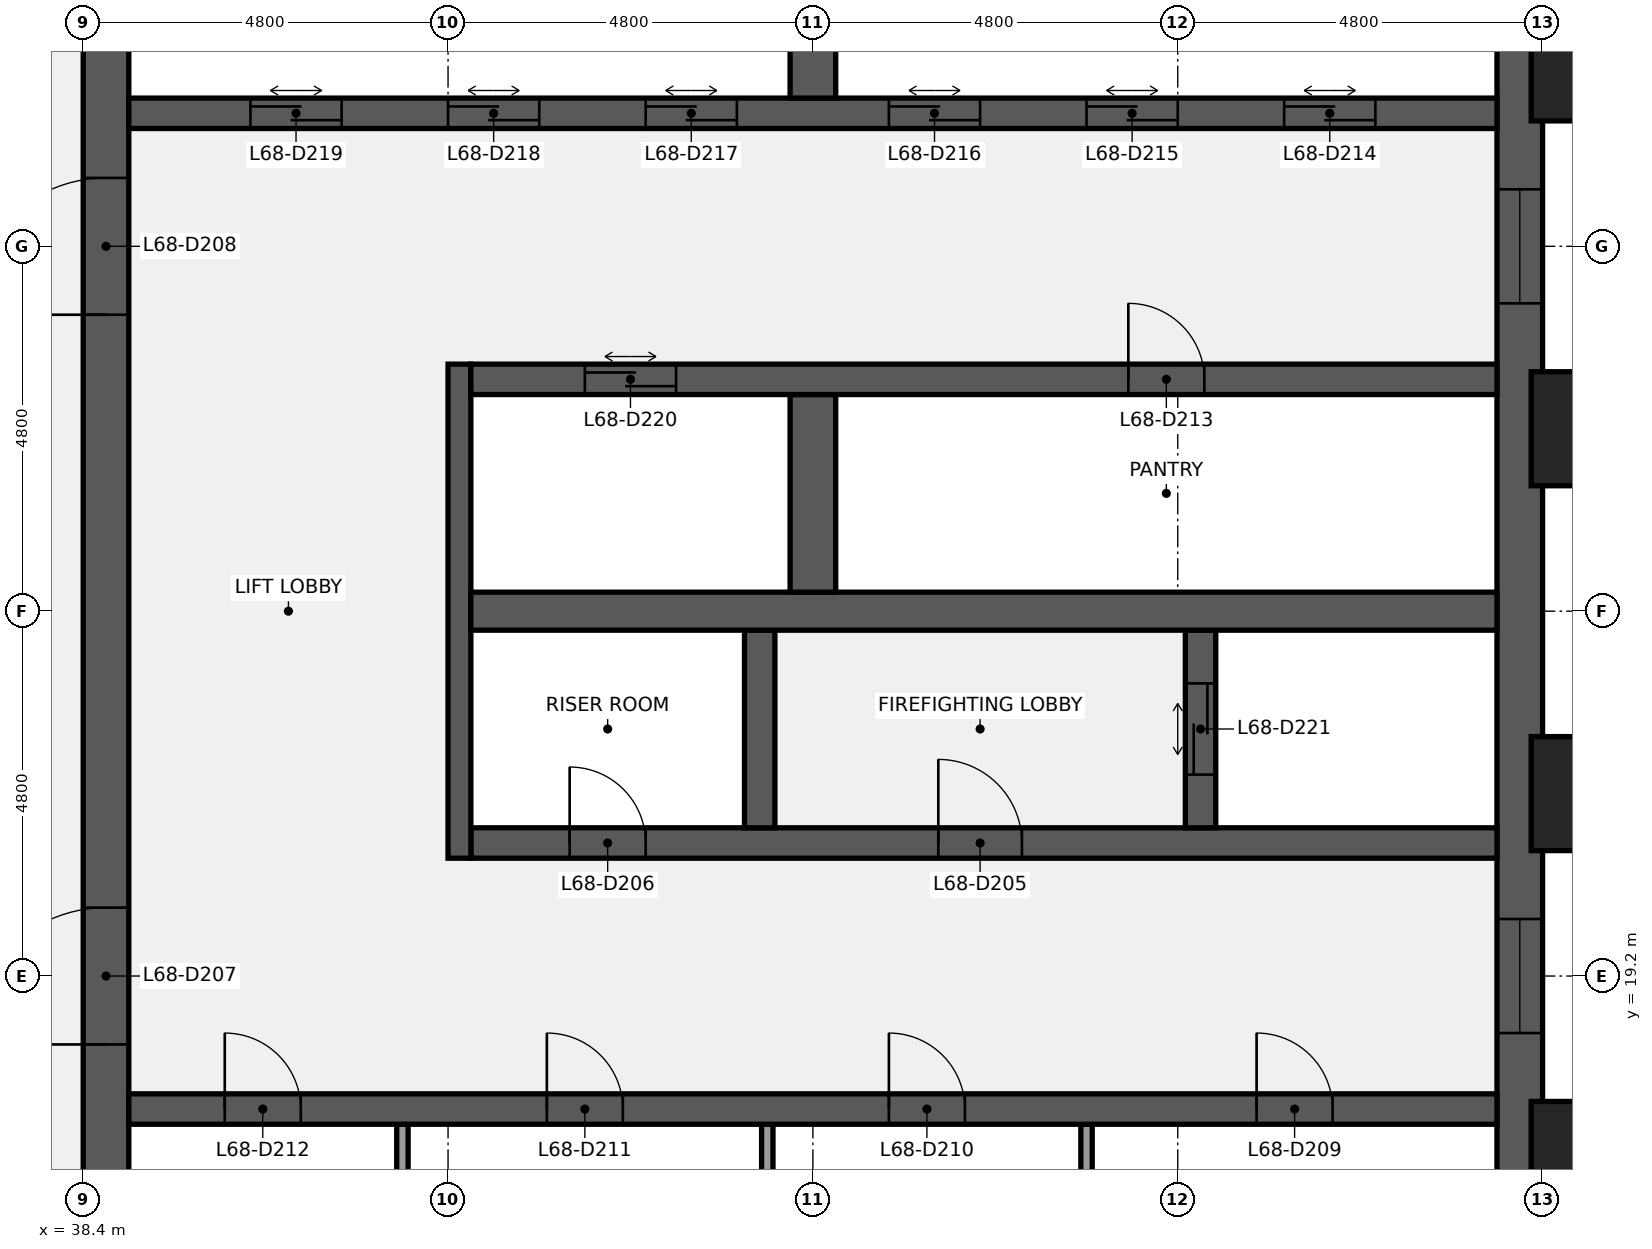
"""IFC4 building model, lengths in metres.
Left out: names, types, materials, properties, quantities, classifications, styles, units other than length and angle.
Written with IfcOpenShell. Run it as: python <this file> out.ifc"""

import sys

from ifc_helpers import new_model, si_unit, direction, frame, frame_2d, origin, origin_2d, place, context, subcontext, project, spatial, rectangle, extrude, element, fill, save


model = new_model("IFC4")
c1 = context("Model", 3, precision=1e-05, world=origin(), true_north=direction((0.0, 1.0)))
c2 = subcontext(c1, "Body", "Model", "MODEL_VIEW")
j1 = project(units=[si_unit("LENGTHUNIT", "METRE"), si_unit("PLANEANGLEUNIT", "RADIAN")], contexts=[c1])
p1 = place(None, origin())
s1 = spatial("IfcSite", under=j1, at=p1, CompositionType="ELEMENT")
p2 = place(p1, origin())
s2 = spatial("IfcBuilding", under=s1, at=p2, CompositionType="ELEMENT")
p3 = place(p2, frame((0.0, 0.0, 310.3)))
s3 = spatial("IfcBuildingStorey", under=s2, at=p3, CompositionType="ELEMENT", Elevation=310.3)
p4 = place(p3, frame((57.3, 38.4, 0.0), z_axis=(0.0, 0.0, 1.0), x_axis=(0.0, -1.0, 0.0)))
e1 = element("IfcWall", 1, at=p4, inside=s3, PredefinedType="SHEAR", context=c2, shape_type="SweptSolid", body=[
    extrude(rectangle(XDim=28.8, YDim=0.6, at=frame_2d((14.4, 0.0))), origin(), (0.0, 0.0, 1.0), 3.84),
])
p5 = place(p4, frame((18.45, 0.0, 0.9)))
e2 = element("IfcOpeningElement", 2, at=p5, cuts=e1, PredefinedType="OPENING", context=c2, shape_type="SweptSolid", body=[
    extrude(rectangle(XDim=1.5, YDim=1.5, at=frame_2d((0.75, 0.75))), frame((0.0, 0.31, 0.0), z_axis=(0.0, -1.0, 0.0), x_axis=(1.0, 0.0, 0.0)), (0.0, 0.0, 1.0), 0.62),
])
p6 = place(p4, frame((8.85, 0.0, 0.9)))
e3 = element("IfcOpeningElement", 3, at=p6, cuts=e1, PredefinedType="OPENING", context=c2, shape_type="SweptSolid", body=[
    extrude(rectangle(XDim=1.5, YDim=1.5, at=frame_2d((0.75, 0.75))), frame((0.0, 0.31, 0.0), z_axis=(0.0, -1.0, 0.0), x_axis=(1.0, 0.0, 0.0)), (0.0, 0.0, 1.0), 0.62),
])
p7 = place(p3, frame((38.7, 9.6, 0.0), z_axis=(0.0, 0.0, 1.0), x_axis=(0.0, 1.0, 0.0)))
e4 = element("IfcWall", 4, at=p7, inside=s3, PredefinedType="SHEAR", context=c2, shape_type="SweptSolid", body=[
    extrude(rectangle(XDim=28.8, YDim=0.6, at=frame_2d((14.4, 0.0))), origin(), (0.0, 0.0, 1.0), 3.84),
])
p8 = place(p7, frame((8.7, 0.0, 0.0)))
e5 = element("IfcOpeningElement", 5, at=p8, cuts=e4, PredefinedType="OPENING", context=c2, shape_type="SweptSolid", body=[
    extrude(rectangle(XDim=1.8, YDim=2.1, at=frame_2d((0.9, 1.05))), frame((0.0, 0.31, 0.0), z_axis=(0.0, -1.0, 0.0), x_axis=(1.0, 0.0, 0.0)), (0.0, 0.0, 1.0), 0.62),
])
p9 = place(p7, frame((18.3, 0.0, 0.0)))
e6 = element("IfcOpeningElement", 6, at=p9, cuts=e4, PredefinedType="OPENING", context=c2, shape_type="SweptSolid", body=[
    extrude(rectangle(XDim=1.8, YDim=2.1, at=frame_2d((0.9, 1.05))), frame((0.0, 0.31, 0.0), z_axis=(0.0, -1.0, 0.0), x_axis=(1.0, 0.0, 0.0)), (0.0, 0.0, 1.0), 0.62),
])
for number, where, z_axis, x_axis in (
    (7, (51.6, 14.65, 0.0), (0.0, 0.0, 1.0), (0.0, 1.0, 0.0)),
    (8, (47.4, 14.65, 0.0), (0.0, 0.0, 1.0), (0.0, 1.0, 0.0)),
    (9, (42.6, 14.65, 0.0), (0.0, 0.0, 1.0), (0.0, 1.0, 0.0)),
):
    element("IfcWall", number, at=place(p3, frame(where, z_axis=z_axis, x_axis=x_axis)), inside=s3, PredefinedType="PARTITIONING", context=c2, shape_type="SweptSolid", body=[
        extrude(rectangle(XDim=2.6, YDim=0.15, at=frame_2d((1.3, 0.0))), origin(), (0.0, 0.0, 1.0), 3.84),
    ])
p10 = place(p3, frame((39.0, 17.45, 0.0), z_axis=(0.0, 0.0, 1.0), x_axis=(1.0, 0.0, 0.0)))
e10 = element("IfcWall", 10, at=p10, inside=s3, PredefinedType="SHEAR", context=c2, shape_type="SweptSolid", body=[
    extrude(rectangle(XDim=18.0, YDim=0.4, at=frame_2d((9.0, 0.0))), origin(), (0.0, 0.0, 1.0), 3.84),
])
p11 = place(p10, frame((14.837, 0.0, 0.0)))
e11 = element("IfcOpeningElement", 11, at=p11, cuts=e10, PredefinedType="OPENING", context=c2, shape_type="SweptSolid", body=[
    extrude(rectangle(XDim=1.0, YDim=2.1, at=frame_2d((0.5, 1.05))), frame((0.0, 0.21, 0.0), z_axis=(0.0, -1.0, 0.0), x_axis=(1.0, 0.0, 0.0)), (0.0, 0.0, 1.0), 0.42),
])
p12 = place(p10, frame((10.0, 0.0, 0.0)))
e12 = element("IfcOpeningElement", 12, at=p12, cuts=e10, PredefinedType="OPENING", context=c2, shape_type="SweptSolid", body=[
    extrude(rectangle(XDim=1.0, YDim=2.1, at=frame_2d((0.5, 1.05))), frame((0.0, 0.21, 0.0), z_axis=(0.0, -1.0, 0.0), x_axis=(1.0, 0.0, 0.0)), (0.0, 0.0, 1.0), 0.42),
])
p13 = place(p10, frame((5.5, 0.0, 0.0)))
e13 = element("IfcOpeningElement", 13, at=p13, cuts=e10, PredefinedType="OPENING", context=c2, shape_type="SweptSolid", body=[
    extrude(rectangle(XDim=1.0, YDim=2.1, at=frame_2d((0.5, 1.05))), frame((0.0, 0.21, 0.0), z_axis=(0.0, -1.0, 0.0), x_axis=(1.0, 0.0, 0.0)), (0.0, 0.0, 1.0), 0.42),
])
p14 = place(p10, frame((1.262, 0.0, 0.0)))
e14 = element("IfcOpeningElement", 14, at=p14, cuts=e10, PredefinedType="OPENING", context=c2, shape_type="SweptSolid", body=[
    extrude(rectangle(XDim=1.0, YDim=2.1, at=frame_2d((0.5, 1.05))), frame((0.0, 0.21, 0.0), z_axis=(0.0, -1.0, 0.0), x_axis=(1.0, 0.0, 0.0)), (0.0, 0.0, 1.0), 0.42),
])
p15 = place(p3, frame((43.5, 20.95, 0.0), z_axis=(0.0, 0.0, 1.0), x_axis=(1.0, 0.0, 0.0)))
e15 = element("IfcWall", 15, at=p15, inside=s3, PredefinedType="SHEAR", context=c2, shape_type="SweptSolid", body=[
    extrude(rectangle(XDim=13.5, YDim=0.4, at=frame_2d((6.75, 0.0))), origin(), (0.0, 0.0, 1.0), 3.84),
])
p16 = place(p15, frame((6.15, 0.0, 0.0)))
e16 = element("IfcOpeningElement", 16, at=p16, cuts=e15, PredefinedType="OPENING", context=c2, shape_type="SweptSolid", body=[
    extrude(rectangle(XDim=1.1, YDim=2.1, at=frame_2d((0.55, 1.05))), frame((0.0, 0.21, 0.0), z_axis=(0.0, -1.0, 0.0), x_axis=(1.0, 0.0, 0.0)), (0.0, 0.0, 1.0), 0.42),
])
p17 = place(p15, frame((1.3, 0.0, 0.0)))
e17 = element("IfcOpeningElement", 17, at=p17, cuts=e15, PredefinedType="OPENING", context=c2, shape_type="SweptSolid", body=[
    extrude(rectangle(XDim=1.0, YDim=2.1, at=frame_2d((0.5, 1.05))), frame((0.0, 0.21, 0.0), z_axis=(0.0, -1.0, 0.0), x_axis=(1.0, 0.0, 0.0)), (0.0, 0.0, 1.0), 0.42),
])
p18 = place(p3, frame((43.35, 20.75, 0.0), z_axis=(0.0, 0.0, 1.0), x_axis=(0.0, 1.0, 0.0)))
e18 = element("IfcWall", 18, at=p18, inside=s3, PredefinedType="SHEAR", context=c2, shape_type="SweptSolid", body=[
    extrude(rectangle(XDim=6.5, YDim=0.3, at=frame_2d((3.25, 0.0))), origin(), (0.0, 0.0, 1.0), 3.84),
])
p19 = place(p3, frame((53.1, 21.15, 0.0), z_axis=(0.0, 0.0, 1.0), x_axis=(0.0, 1.0, 0.0)))
e19 = element("IfcWall", 19, at=p19, inside=s3, PredefinedType="SHEAR", context=c2, shape_type="SweptSolid", body=[
    extrude(rectangle(XDim=2.6, YDim=0.4, at=frame_2d((1.3, 0.0))), origin(), (0.0, 0.0, 1.0), 3.84),
])
p20 = place(p19, frame((0.7, 0.0, 0.0)))
e20 = element("IfcOpeningElement", 20, at=p20, cuts=e19, PredefinedType="OPENING", context=c2, shape_type="SweptSolid", body=[
    extrude(rectangle(XDim=1.2, YDim=2.1, at=frame_2d((0.6, 1.05))), frame((0.0, 0.21, 0.0), z_axis=(0.0, -1.0, 0.0), x_axis=(1.0, 0.0, 0.0)), (0.0, 0.0, 1.0), 0.42),
])
p21 = place(p3, frame((47.3, 21.15, 0.0), z_axis=(0.0, 0.0, 1.0), x_axis=(0.0, 1.0, 0.0)))
e21 = element("IfcWall", 21, at=p21, inside=s3, PredefinedType="SHEAR", context=c2, shape_type="SweptSolid", body=[
    extrude(rectangle(XDim=2.6, YDim=0.4, at=frame_2d((1.3, 0.0))), origin(), (0.0, 0.0, 1.0), 3.84),
])
p22 = place(p3, frame((43.5, 24.0, 0.0), z_axis=(0.0, 0.0, 1.0), x_axis=(1.0, 0.0, 0.0)))
e22 = element("IfcWall", 22, at=p22, inside=s3, PredefinedType="SHEAR", context=c2, shape_type="SweptSolid", body=[
    extrude(rectangle(XDim=13.5, YDim=0.5, at=frame_2d((6.75, 0.0))), origin(), (0.0, 0.0, 1.0), 3.84),
])
p23 = place(p3, frame((48.0, 24.25, 0.0), z_axis=(0.0, 0.0, 1.0), x_axis=(0.0, 1.0, 0.0)))
e23 = element("IfcWall", 23, at=p23, inside=s3, PredefinedType="SHEAR", context=c2, shape_type="SweptSolid", body=[
    extrude(rectangle(XDim=2.6, YDim=0.6, at=frame_2d((1.3, 0.0))), origin(), (0.0, 0.0, 1.0), 3.84),
])
p24 = place(p3, frame((43.5, 27.05, 0.0), z_axis=(0.0, 0.0, 1.0), x_axis=(1.0, 0.0, 0.0)))
e24 = element("IfcWall", 24, at=p24, inside=s3, PredefinedType="SHEAR", context=c2, shape_type="SweptSolid", body=[
    extrude(rectangle(XDim=13.5, YDim=0.4, at=frame_2d((6.75, 0.0))), origin(), (0.0, 0.0, 1.0), 3.84),
])
p25 = place(p24, frame((8.65, 0.0, 0.0)))
e25 = element("IfcOpeningElement", 25, at=p25, cuts=e24, PredefinedType="OPENING", context=c2, shape_type="SweptSolid", body=[
    extrude(rectangle(XDim=1.0, YDim=2.1, at=frame_2d((0.5, 1.05))), frame((0.0, 0.21, 0.0), z_axis=(0.0, -1.0, 0.0), x_axis=(1.0, 0.0, 0.0)), (0.0, 0.0, 1.0), 0.42),
])
p26 = place(p24, frame((1.5, 0.0, 0.0)))
e26 = element("IfcOpeningElement", 26, at=p26, cuts=e24, PredefinedType="OPENING", context=c2, shape_type="SweptSolid", body=[
    extrude(rectangle(XDim=1.2, YDim=2.1, at=frame_2d((0.6, 1.05))), frame((0.0, 0.21, 0.0), z_axis=(0.0, -1.0, 0.0), x_axis=(1.0, 0.0, 0.0)), (0.0, 0.0, 1.0), 0.42),
])
p27 = place(p3, frame((39.0, 30.55, 0.0), z_axis=(0.0, 0.0, 1.0), x_axis=(1.0, 0.0, 0.0)))
e27 = element("IfcWall", 27, at=p27, inside=s3, PredefinedType="SHEAR", context=c2, shape_type="SweptSolid", body=[
    extrude(rectangle(XDim=18.0, YDim=0.4, at=frame_2d((9.0, 0.0))), origin(), (0.0, 0.0, 1.0), 3.84),
])
p28 = place(p27, frame((15.2, 0.0, 0.0)))
e28 = element("IfcOpeningElement", 28, at=p28, cuts=e27, PredefinedType="OPENING", context=c2, shape_type="SweptSolid", body=[
    extrude(rectangle(XDim=1.2, YDim=2.1, at=frame_2d((0.6, 1.05))), frame((0.0, 0.21, 0.0), z_axis=(0.0, -1.0, 0.0), x_axis=(1.0, 0.0, 0.0)), (0.0, 0.0, 1.0), 0.42),
])
p29 = place(p27, frame((12.6, 0.0, 0.0)))
e29 = element("IfcOpeningElement", 29, at=p29, cuts=e27, PredefinedType="OPENING", context=c2, shape_type="SweptSolid", body=[
    extrude(rectangle(XDim=1.2, YDim=2.1, at=frame_2d((0.6, 1.05))), frame((0.0, 0.21, 0.0), z_axis=(0.0, -1.0, 0.0), x_axis=(1.0, 0.0, 0.0)), (0.0, 0.0, 1.0), 0.42),
])
p30 = place(p27, frame((10.0, 0.0, 0.0)))
e30 = element("IfcOpeningElement", 30, at=p30, cuts=e27, PredefinedType="OPENING", context=c2, shape_type="SweptSolid", body=[
    extrude(rectangle(XDim=1.2, YDim=2.1, at=frame_2d((0.6, 1.05))), frame((0.0, 0.21, 0.0), z_axis=(0.0, -1.0, 0.0), x_axis=(1.0, 0.0, 0.0)), (0.0, 0.0, 1.0), 0.42),
])
p31 = place(p27, frame((6.8, 0.0, 0.0)))
e31 = element("IfcOpeningElement", 31, at=p31, cuts=e27, PredefinedType="OPENING", context=c2, shape_type="SweptSolid", body=[
    extrude(rectangle(XDim=1.2, YDim=2.1, at=frame_2d((0.6, 1.05))), frame((0.0, 0.21, 0.0), z_axis=(0.0, -1.0, 0.0), x_axis=(1.0, 0.0, 0.0)), (0.0, 0.0, 1.0), 0.42),
])
p32 = place(p27, frame((4.2, 0.0, 0.0)))
e32 = element("IfcOpeningElement", 32, at=p32, cuts=e27, PredefinedType="OPENING", context=c2, shape_type="SweptSolid", body=[
    extrude(rectangle(XDim=1.2, YDim=2.1, at=frame_2d((0.6, 1.05))), frame((0.0, 0.21, 0.0), z_axis=(0.0, -1.0, 0.0), x_axis=(1.0, 0.0, 0.0)), (0.0, 0.0, 1.0), 0.42),
])
p33 = place(p27, frame((1.6, 0.0, 0.0)))
e33 = element("IfcOpeningElement", 33, at=p33, cuts=e27, PredefinedType="OPENING", context=c2, shape_type="SweptSolid", body=[
    extrude(rectangle(XDim=1.2, YDim=2.1, at=frame_2d((0.6, 1.05))), frame((0.0, 0.21, 0.0), z_axis=(0.0, -1.0, 0.0), x_axis=(1.0, 0.0, 0.0)), (0.0, 0.0, 1.0), 0.42),
])
p34 = place(p3, frame((48.0, 30.75, 0.0), z_axis=(0.0, 0.0, 1.0), x_axis=(0.0, 1.0, 0.0)))
e34 = element("IfcWall", 34, at=p34, inside=s3, PredefinedType="SHEAR", context=c2, shape_type="SweptSolid", body=[
    extrude(rectangle(XDim=2.6, YDim=0.6, at=frame_2d((1.3, 0.0))), origin(), (0.0, 0.0, 1.0), 3.84),
])
for number, where, z_axis, x_axis in (
    (35, (58.35, 16.8, 0.0), (0.0, 0.0, 1.0), (0.0, 1.0, 0.0)),
    (36, (58.35, 21.6, 0.0), (0.0, 0.0, 1.0), (0.0, 1.0, 0.0)),
    (37, (58.35, 26.4, 0.0), (0.0, 0.0, 1.0), (0.0, 1.0, 0.0)),
    (38, (58.35, 31.2, 0.0), (0.0, 0.0, 1.0), (0.0, 1.0, 0.0)),
):
    element("IfcColumn", number, at=place(p3, frame(where, z_axis=z_axis, x_axis=x_axis)), inside=s3, PredefinedType="PILASTER", context=c2, shape_type="SweptSolid", body=[
        extrude(rectangle(XDim=1.8, YDim=1.5, at=origin_2d()), origin(), (0.0, 0.0, 1.0), 4.0),
    ])
p35 = place(p16, origin())
e39 = element("IfcDoor", 39, at=p35, inside=s3, OperationType="SINGLE_SWING_LEFT", PredefinedType="DOOR", context=c2, shape_type="SweptSolid", body=[
    extrude(rectangle(XDim=1.1, YDim=2.1, at=frame_2d((0.55, 1.05))), frame((0.0, 0.025, 0.0), z_axis=(0.0, -1.0, 0.0), x_axis=(1.0, 0.0, 0.0)), (0.0, 0.0, 1.0), 0.05),
])
fill(e16, e39)
p36 = place(p17, origin())
e40 = element("IfcDoor", 40, at=p36, inside=s3, OperationType="SINGLE_SWING_LEFT", PredefinedType="DOOR", context=c2, shape_type="SweptSolid", body=[
    extrude(rectangle(XDim=1.0, YDim=2.1, at=frame_2d((0.5, 1.05))), frame((0.0, 0.025, 0.0), z_axis=(0.0, -1.0, 0.0), x_axis=(1.0, 0.0, 0.0)), (0.0, 0.0, 1.0), 0.05),
])
fill(e17, e40)
p37 = place(p8, origin())
e41 = element("IfcDoor", 41, at=p37, inside=s3, OperationType="DOUBLE_DOOR_SINGLE_SWING", PredefinedType="DOOR", context=c2, shape_type="SweptSolid", body=[
    extrude(rectangle(XDim=1.8, YDim=2.1, at=frame_2d((0.9, 1.05))), frame((0.0, 0.025, 0.0), z_axis=(0.0, -1.0, 0.0), x_axis=(1.0, 0.0, 0.0)), (0.0, 0.0, 1.0), 0.05),
])
fill(e5, e41)
p38 = place(p9, origin())
e42 = element("IfcDoor", 42, at=p38, inside=s3, OperationType="DOUBLE_DOOR_SINGLE_SWING", PredefinedType="DOOR", context=c2, shape_type="SweptSolid", body=[
    extrude(rectangle(XDim=1.8, YDim=2.1, at=frame_2d((0.9, 1.05))), frame((0.0, 0.025, 0.0), z_axis=(0.0, -1.0, 0.0), x_axis=(1.0, 0.0, 0.0)), (0.0, 0.0, 1.0), 0.05),
])
fill(e6, e42)
p39 = place(p11, origin())
e43 = element("IfcDoor", 43, at=p39, inside=s3, OperationType="SINGLE_SWING_LEFT", PredefinedType="DOOR", context=c2, shape_type="SweptSolid", body=[
    extrude(rectangle(XDim=1.0, YDim=2.1, at=frame_2d((0.5, 1.05))), frame((0.0, 0.025, 0.0), z_axis=(0.0, -1.0, 0.0), x_axis=(1.0, 0.0, 0.0)), (0.0, 0.0, 1.0), 0.05),
])
fill(e11, e43)
p40 = place(p12, origin())
e44 = element("IfcDoor", 44, at=p40, inside=s3, OperationType="SINGLE_SWING_LEFT", PredefinedType="DOOR", context=c2, shape_type="SweptSolid", body=[
    extrude(rectangle(XDim=1.0, YDim=2.1, at=frame_2d((0.5, 1.05))), frame((0.0, 0.025, 0.0), z_axis=(0.0, -1.0, 0.0), x_axis=(1.0, 0.0, 0.0)), (0.0, 0.0, 1.0), 0.05),
])
fill(e12, e44)
p41 = place(p13, origin())
e45 = element("IfcDoor", 45, at=p41, inside=s3, OperationType="SINGLE_SWING_LEFT", PredefinedType="DOOR", context=c2, shape_type="SweptSolid", body=[
    extrude(rectangle(XDim=1.0, YDim=2.1, at=frame_2d((0.5, 1.05))), frame((0.0, 0.025, 0.0), z_axis=(0.0, -1.0, 0.0), x_axis=(1.0, 0.0, 0.0)), (0.0, 0.0, 1.0), 0.05),
])
fill(e13, e45)
p42 = place(p14, origin())
e46 = element("IfcDoor", 46, at=p42, inside=s3, OperationType="SINGLE_SWING_LEFT", PredefinedType="DOOR", context=c2, shape_type="SweptSolid", body=[
    extrude(rectangle(XDim=1.0, YDim=2.1, at=frame_2d((0.5, 1.05))), frame((0.0, 0.025, 0.0), z_axis=(0.0, -1.0, 0.0), x_axis=(1.0, 0.0, 0.0)), (0.0, 0.0, 1.0), 0.05),
])
fill(e14, e46)
p43 = place(p25, origin())
e47 = element("IfcDoor", 47, at=p43, inside=s3, OperationType="SINGLE_SWING_LEFT", PredefinedType="DOOR", context=c2, shape_type="SweptSolid", body=[
    extrude(rectangle(XDim=1.0, YDim=2.1, at=frame_2d((0.5, 1.05))), frame((0.0, 0.025, 0.0), z_axis=(0.0, -1.0, 0.0), x_axis=(1.0, 0.0, 0.0)), (0.0, 0.0, 1.0), 0.05),
])
fill(e25, e47)
p44 = place(p28, origin())
e48 = element("IfcDoor", 48, at=p44, inside=s3, OperationType="DOUBLE_DOOR_SLIDING", PredefinedType="DOOR", context=c2, shape_type="SweptSolid", body=[
    extrude(rectangle(XDim=1.2, YDim=2.1, at=frame_2d((0.6, 1.05))), frame((0.0, 0.025, 0.0), z_axis=(0.0, -1.0, 0.0), x_axis=(1.0, 0.0, 0.0)), (0.0, 0.0, 1.0), 0.05),
])
fill(e28, e48)
p45 = place(p29, origin())
e49 = element("IfcDoor", 49, at=p45, inside=s3, OperationType="DOUBLE_DOOR_SLIDING", PredefinedType="DOOR", context=c2, shape_type="SweptSolid", body=[
    extrude(rectangle(XDim=1.2, YDim=2.1, at=frame_2d((0.6, 1.05))), frame((0.0, 0.025, 0.0), z_axis=(0.0, -1.0, 0.0), x_axis=(1.0, 0.0, 0.0)), (0.0, 0.0, 1.0), 0.05),
])
fill(e29, e49)
p46 = place(p30, origin())
e50 = element("IfcDoor", 50, at=p46, inside=s3, OperationType="DOUBLE_DOOR_SLIDING", PredefinedType="DOOR", context=c2, shape_type="SweptSolid", body=[
    extrude(rectangle(XDim=1.2, YDim=2.1, at=frame_2d((0.6, 1.05))), frame((0.0, 0.025, 0.0), z_axis=(0.0, -1.0, 0.0), x_axis=(1.0, 0.0, 0.0)), (0.0, 0.0, 1.0), 0.05),
])
fill(e30, e50)
p47 = place(p31, origin())
e51 = element("IfcDoor", 51, at=p47, inside=s3, OperationType="DOUBLE_DOOR_SLIDING", PredefinedType="DOOR", context=c2, shape_type="SweptSolid", body=[
    extrude(rectangle(XDim=1.2, YDim=2.1, at=frame_2d((0.6, 1.05))), frame((0.0, 0.025, 0.0), z_axis=(0.0, -1.0, 0.0), x_axis=(1.0, 0.0, 0.0)), (0.0, 0.0, 1.0), 0.05),
])
fill(e31, e51)
p48 = place(p32, origin())
e52 = element("IfcDoor", 52, at=p48, inside=s3, OperationType="DOUBLE_DOOR_SLIDING", PredefinedType="DOOR", context=c2, shape_type="SweptSolid", body=[
    extrude(rectangle(XDim=1.2, YDim=2.1, at=frame_2d((0.6, 1.05))), frame((0.0, 0.025, 0.0), z_axis=(0.0, -1.0, 0.0), x_axis=(1.0, 0.0, 0.0)), (0.0, 0.0, 1.0), 0.05),
])
fill(e32, e52)
p49 = place(p33, origin())
e53 = element("IfcDoor", 53, at=p49, inside=s3, OperationType="DOUBLE_DOOR_SLIDING", PredefinedType="DOOR", context=c2, shape_type="SweptSolid", body=[
    extrude(rectangle(XDim=1.2, YDim=2.1, at=frame_2d((0.6, 1.05))), frame((0.0, 0.025, 0.0), z_axis=(0.0, -1.0, 0.0), x_axis=(1.0, 0.0, 0.0)), (0.0, 0.0, 1.0), 0.05),
])
fill(e33, e53)
p50 = place(p26, origin())
e54 = element("IfcDoor", 54, at=p50, inside=s3, OperationType="DOUBLE_DOOR_SLIDING", PredefinedType="DOOR", context=c2, shape_type="SweptSolid", body=[
    extrude(rectangle(XDim=1.2, YDim=2.1, at=frame_2d((0.6, 1.05))), frame((0.0, 0.025, 0.0), z_axis=(0.0, -1.0, 0.0), x_axis=(1.0, 0.0, 0.0)), (0.0, 0.0, 1.0), 0.05),
])
fill(e26, e54)
p51 = place(p20, origin())
e55 = element("IfcDoor", 55, at=p51, inside=s3, OperationType="DOUBLE_DOOR_SLIDING", PredefinedType="DOOR", context=c2, shape_type="SweptSolid", body=[
    extrude(rectangle(XDim=1.2, YDim=2.1, at=frame_2d((0.6, 1.05))), frame((0.0, 0.025, 0.0), z_axis=(0.0, -1.0, 0.0), x_axis=(1.0, 0.0, 0.0)), (0.0, 0.0, 1.0), 0.05),
])
fill(e20, e55)
p52 = place(p5, origin())
e56 = element("IfcWindow", 56, at=p52, inside=s3, PartitioningType="SINGLE_PANEL", PredefinedType="WINDOW", context=c2, shape_type="SweptSolid", body=[
    extrude(rectangle(XDim=1.5, YDim=1.5, at=frame_2d((0.75, 0.75))), frame((0.0, 0.03, 0.0), z_axis=(0.0, -1.0, 0.0), x_axis=(1.0, 0.0, 0.0)), (0.0, 0.0, 1.0), 0.06),
])
fill(e2, e56)
p53 = place(p6, origin())
e57 = element("IfcWindow", 57, at=p53, inside=s3, PartitioningType="SINGLE_PANEL", PredefinedType="WINDOW", context=c2, shape_type="SweptSolid", body=[
    extrude(rectangle(XDim=1.5, YDim=1.5, at=frame_2d((0.75, 0.75))), frame((0.0, 0.03, 0.0), z_axis=(0.0, -1.0, 0.0), x_axis=(1.0, 0.0, 0.0)), (0.0, 0.0, 1.0), 0.06),
])
fill(e3, e57)
save(model, sys.argv[1])
